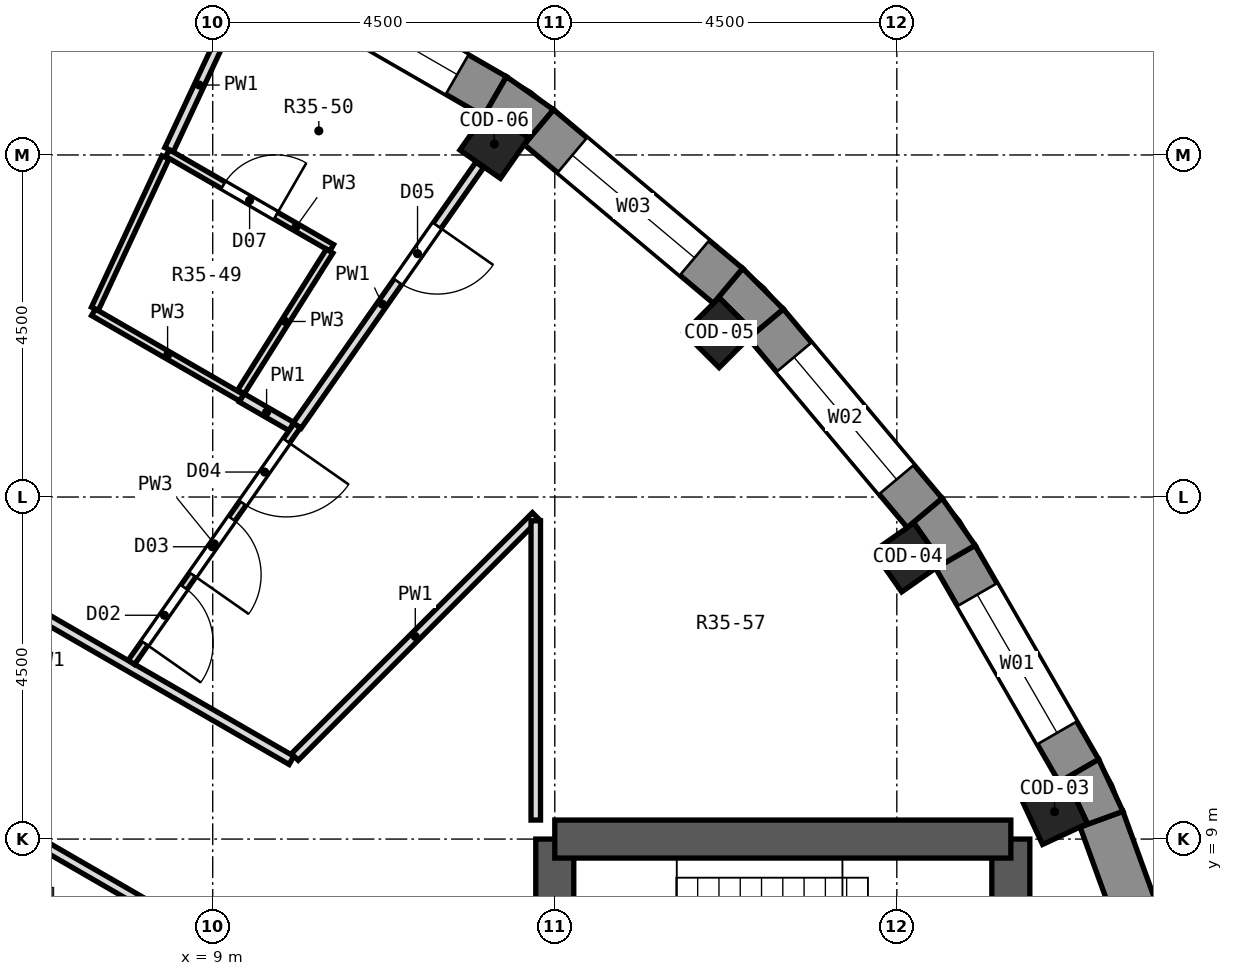
"""IFC4 building model, lengths in metres.
Left out: names, types, materials, properties, quantities, classifications, styles, units other than length and angle.
Written with IfcOpenShell. Run it as: python <this file> out.ifc"""

import sys

from ifc_helpers import new_model, si_unit, direction, frame, frame_2d, origin, origin_2d, place, context, subcontext, project, spatial, polyline, rectangle, outline, extrude, element, fill, save


model = new_model("IFC4")
c1 = context("Model", 3, precision=1e-05, world=origin(), true_north=direction((0.0, 1.0)))
c2 = subcontext(c1, "Body", "Model", "MODEL_VIEW")
j1 = project(units=[si_unit("LENGTHUNIT", "METRE"), si_unit("PLANEANGLEUNIT", "RADIAN")], contexts=[c1])
p1 = place(None, origin())
s1 = spatial("IfcSite", under=j1, at=p1, CompositionType="ELEMENT")
p2 = place(p1, origin())
s2 = spatial("IfcBuilding", under=s1, at=p2, CompositionType="ELEMENT")
p3 = place(p2, frame((0.0, 0.0, 249.5)))
s3 = spatial("IfcBuildingStorey", under=s2, at=p3, CompositionType="ELEMENT", Elevation=249.5)
for number, where, z_axis, x_axis in (
    (1, (20.075, 9.361, 0.0), (0.0, 0.0, 1.0), (0.906, 0.423, 0.0)),
    (2, (18.144, 12.705, 0.0), (0.0, 0.0, 1.0), (0.819, 0.574, 0.0)),
    (3, (15.662, 15.662, 0.0), (0.0, 0.0, 1.0), (0.707, 0.707, 0.0)),
    (4, (12.705, 18.144, 0.0), (0.0, 0.0, 1.0), (0.574, 0.819, 0.0)),
):
    element("IfcColumn", number, at=place(p3, frame(where, z_axis=z_axis, x_axis=x_axis)), inside=s3, PredefinedType="COLUMN", context=c2, shape_type="SweptSolid", body=[
        extrude(rectangle(XDim=0.65, YDim=0.65, at=origin_2d()), origin(), (0.0, 0.0, 1.0), 3.3),
    ])
p4 = place(p3, frame((13.5, -9.0, 0.0), z_axis=(0.0, 0.0, 1.0), x_axis=(0.0, 1.0, 0.0)))
e5 = element("IfcWall", 5, at=p4, inside=s3, PredefinedType="SHEAR", context=c2, shape_type="SweptSolid", body=[
    extrude(rectangle(XDim=18.0, YDim=0.5, at=frame_2d((9.0, 0.0))), origin(), (0.0, 0.0, 1.0), 3.3),
])
p5 = place(p4, frame((15.4, 0.0, 0.0)))
e6 = element("IfcOpeningElement", 6, at=p5, cuts=e5, PredefinedType="OPENING", context=c2, shape_type="SweptSolid", body=[
    extrude(rectangle(XDim=1.2, YDim=2.1, at=frame_2d((0.6, 1.05))), frame((0.0, 0.262, 0.0), z_axis=(0.0, -1.0, 0.0), x_axis=(1.0, 0.0, 0.0)), (0.0, 0.0, 1.0), 0.524),
])
p6 = place(p4, frame((1.4, 0.0, 0.0)))
e7 = element("IfcOpeningElement", 7, at=p6, cuts=e5, PredefinedType="OPENING", context=c2, shape_type="SweptSolid", body=[
    extrude(rectangle(XDim=1.2, YDim=2.1, at=frame_2d((0.6, 1.05))), frame((0.0, 0.262, 0.0), z_axis=(0.0, -1.0, 0.0), x_axis=(1.0, 0.0, 0.0)), (0.0, 0.0, 1.0), 0.524),
])
p7 = place(p4, frame((7.5, 0.0, 0.0)))
e8 = element("IfcOpeningElement", 8, at=p7, cuts=e5, PredefinedType="OPENING", context=c2, shape_type="SweptSolid", body=[
    extrude(rectangle(XDim=3.0, YDim=2.4, at=frame_2d((1.5, 1.2))), frame((0.0, 0.262, 0.0), z_axis=(0.0, -1.0, 0.0), x_axis=(1.0, 0.0, 0.0)), (0.0, 0.0, 1.0), 0.524),
])
p8 = place(p3, frame((19.5, -9.0, 0.0), z_axis=(0.0, 0.0, 1.0), x_axis=(0.0, 1.0, 0.0)))
e9 = element("IfcWall", 9, at=p8, inside=s3, PredefinedType="SHEAR", context=c2, shape_type="SweptSolid", body=[
    extrude(rectangle(XDim=18.0, YDim=0.5, at=frame_2d((9.0, 0.0))), origin(), (0.0, 0.0, 1.0), 3.3),
])
p9 = place(p8, frame((9.45, 0.0, 0.0)))
e10 = element("IfcOpeningElement", 10, at=p9, cuts=e9, PredefinedType="OPENING", context=c2, shape_type="SweptSolid", body=[
    extrude(rectangle(XDim=0.9, YDim=2.1, at=frame_2d((0.45, 1.05))), frame((0.0, 0.262, 0.0), z_axis=(0.0, -1.0, 0.0), x_axis=(1.0, 0.0, 0.0)), (0.0, 0.0, 1.0), 0.524),
])
p10 = place(p8, frame((7.65, 0.0, 0.0)))
e11 = element("IfcOpeningElement", 11, at=p10, cuts=e9, PredefinedType="OPENING", context=c2, shape_type="SweptSolid", body=[
    extrude(rectangle(XDim=0.9, YDim=2.1, at=frame_2d((0.45, 1.05))), frame((0.0, 0.262, 0.0), z_axis=(0.0, -1.0, 0.0), x_axis=(1.0, 0.0, 0.0)), (0.0, 0.0, 1.0), 0.524),
])
p11 = place(p3, frame((13.5, 9.0, 0.0), z_axis=(0.0, 0.0, 1.0), x_axis=(1.0, 0.0, 0.0)))
e12 = element("IfcWall", 12, at=p11, inside=s3, PredefinedType="SHEAR", context=c2, shape_type="SweptSolid", body=[
    extrude(rectangle(XDim=6.0, YDim=0.5, at=frame_2d((3.0, 0.0))), origin(), (0.0, 0.0, 1.0), 3.3),
])
p12 = place(p3, frame((21.805, 6.206, 0.0), z_axis=(0.0, 0.0, 1.0), x_axis=(-0.342056509473, 0.939679383794, 0.0)))
e13 = element("IfcWall", 13, at=p12, inside=s3, PredefinedType="SOLIDWALL", context=c2, shape_type="SweptSolid", body=[
    extrude(rectangle(XDim=3.252, YDim=0.6, at=frame_2d((1.626, 0.0))), origin(), (0.0, 0.0, 1.0), 2.9),
])
p13 = place(p3, frame((20.396, 9.898, 0.0), z_axis=(0.0, 0.0, 1.0), x_axis=(-0.500014901547, 0.866016800201, 0.0)))
e14 = element("IfcWall", 14, at=p13, inside=s3, PredefinedType="SOLIDWALL", context=c2, shape_type="SweptSolid", body=[
    extrude(rectangle(XDim=3.252, YDim=0.6, at=frame_2d((1.626, 0.0))), origin(), (0.0, 0.0, 1.0), 2.9),
])
p14 = place(p13, frame((0.576, 0.0, 0.9)))
e15 = element("IfcOpeningElement", 15, at=p14, cuts=e14, PredefinedType="OPENING", context=c2, shape_type="SweptSolid", body=[
    extrude(rectangle(XDim=2.1, YDim=1.8, at=frame_2d((1.05, 0.9))), frame((0.0, 0.312, 0.0), z_axis=(0.0, -1.0, 0.0), x_axis=(1.0, 0.0, 0.0)), (0.0, 0.0, 1.0), 0.624),
])
p15 = place(p3, frame((18.367, 13.29, 0.0), z_axis=(0.0, 0.0, 1.0), x_axis=(-0.64277291405, 0.766056773982, 0.0)))
e16 = element("IfcWall", 16, at=p15, inside=s3, PredefinedType="SOLIDWALL", context=c2, shape_type="SweptSolid", body=[
    extrude(rectangle(XDim=3.252, YDim=0.6, at=frame_2d((1.626, 0.0))), origin(), (0.0, 0.0, 1.0), 2.9),
])
p16 = place(p15, frame((0.576, 0.0, 0.9)))
e17 = element("IfcOpeningElement", 17, at=p16, cuts=e16, PredefinedType="OPENING", context=c2, shape_type="SweptSolid", body=[
    extrude(rectangle(XDim=2.1, YDim=1.8, at=frame_2d((1.05, 0.9))), frame((0.0, 0.312, 0.0), z_axis=(0.0, -1.0, 0.0), x_axis=(1.0, 0.0, 0.0)), (0.0, 0.0, 1.0), 0.624),
])
p17 = place(p3, frame((15.781, 16.277, 0.0), z_axis=(0.0, 0.0, 1.0), x_axis=(-0.766056773982, 0.64277291405, 0.0)))
e18 = element("IfcWall", 18, at=p17, inside=s3, PredefinedType="SOLIDWALL", context=c2, shape_type="SweptSolid", body=[
    extrude(rectangle(XDim=3.252, YDim=0.6, at=frame_2d((1.626, 0.0))), origin(), (0.0, 0.0, 1.0), 2.9),
])
p18 = place(p17, frame((0.576, 0.0, 0.9)))
e19 = element("IfcOpeningElement", 19, at=p18, cuts=e18, PredefinedType="OPENING", context=c2, shape_type="SweptSolid", body=[
    extrude(rectangle(XDim=2.1, YDim=1.8, at=frame_2d((1.05, 0.9))), frame((0.0, 0.312, 0.0), z_axis=(0.0, -1.0, 0.0), x_axis=(1.0, 0.0, 0.0)), (0.0, 0.0, 1.0), 0.624),
])
p19 = place(p3, frame((12.714, 18.77, 0.0), z_axis=(0.0, 0.0, 1.0), x_axis=(-0.866016800201, 0.500014901547, 0.0)))
e20 = element("IfcWall", 20, at=p19, inside=s3, PredefinedType="SOLIDWALL", context=c2, shape_type="SweptSolid", body=[
    extrude(rectangle(XDim=3.252, YDim=0.6, at=frame_2d((1.626, 0.0))), origin(), (0.0, 0.0, 1.0), 2.9),
])
p20 = place(p19, frame((0.576, 0.0, 0.9)))
e21 = element("IfcOpeningElement", 21, at=p20, cuts=e20, PredefinedType="OPENING", context=c2, shape_type="SweptSolid", body=[
    extrude(rectangle(XDim=2.1, YDim=1.8, at=frame_2d((1.05, 0.9))), frame((0.0, 0.312, 0.0), z_axis=(0.0, -1.0, 0.0), x_axis=(1.0, 0.0, 0.0)), (0.0, 0.0, 1.0), 0.624),
])
p21 = place(p3, origin())
e22 = element("IfcWall", 22, at=p21, inside=s3, PredefinedType="SOLIDWALL", context=c2, shape_type="SweptSolid", body=[
    extrude(outline(polyline([(20.975, 9.364), (20.656, 10.048), (20.136, 9.748), (20.232, 9.793), (20.507, 9.204), (20.411, 9.159), (20.975, 9.364)])), origin(), (0.0, 0.0, 1.0), 2.9),
])
p22 = place(p3, origin())
e23 = element("IfcWall", 23, at=p22, inside=s3, PredefinedType="SOLIDWALL", context=c2, shape_type="SweptSolid", body=[
    extrude(outline(polyline([(19.03, 12.864), (18.597, 13.482), (18.137, 13.097), (18.224, 13.157), (18.597, 12.625), (18.51, 12.564), (19.03, 12.864)])), origin(), (0.0, 0.0, 1.0), 2.9),
])
p23 = place(p3, origin())
e24 = element("IfcWall", 24, at=p23, inside=s3, PredefinedType="SOLIDWALL", context=c2, shape_type="SweptSolid", body=[
    extrude(outline(polyline([(15.973, 16.507), (15.588, 16.047), (15.662, 16.122), (16.122, 15.662), (16.047, 15.588), (16.507, 15.973), (15.973, 16.507)])), origin(), (0.0, 0.0, 1.0), 2.9),
])
p24 = place(p3, origin())
e25 = element("IfcWall", 25, at=p24, inside=s3, PredefinedType="SOLIDWALL", context=c2, shape_type="SweptSolid", body=[
    extrude(outline(polyline([(12.864, 19.03), (12.564, 18.51), (12.625, 18.597), (13.157, 18.224), (13.097, 18.137), (13.482, 18.597), (12.864, 19.03)])), origin(), (0.0, 0.0, 1.0), 2.9),
])
p25 = place(p3, frame((2.915, 11.146, 0.0), z_axis=(0.0, 0.0, 1.0), x_axis=(0.866022982797, -0.500004193249, 0.0)))
e26 = element("IfcWall", 26, at=p25, inside=s3, PredefinedType="PARTITIONING", context=c2, shape_type="SweptSolid", body=[
    extrude(rectangle(XDim=6.026, YDim=0.125, at=frame_2d((3.013, 0.0))), origin(), (0.0, 0.0, 1.0), 2.9),
])
p26 = place(p25, frame((2.498, 0.0, 0.0)))
e27 = element("IfcOpeningElement", 27, at=p26, cuts=e26, PredefinedType="OPENING", context=c2, shape_type="SweptSolid", body=[
    extrude(rectangle(XDim=1.0, YDim=2.1, at=frame_2d((0.5, 1.05))), frame((0.0, 0.074, 0.0), z_axis=(0.0, -1.0, 0.0), x_axis=(1.0, 0.0, 0.0)), (0.0, 0.0, 1.0), 0.149),
])
p27 = place(p3, frame((3.611, 13.747, 0.0), z_axis=(0.0, 0.0, 1.0), x_axis=(0.865964194244, -0.500106003051, 0.0)))
e28 = element("IfcWall", 28, at=p27, inside=s3, PredefinedType="PARTITIONING", context=c2, shape_type="SweptSolid", body=[
    extrude(rectangle(XDim=7.42, YDim=0.125, at=frame_2d((3.71, 0.0))), origin(), (0.0, 0.0, 1.0), 2.9),
])
p28 = place(p27, frame((2.007, 0.0, 0.0)))
e29 = element("IfcOpeningElement", 29, at=p28, cuts=e28, PredefinedType="OPENING", context=c2, shape_type="SweptSolid", body=[
    extrude(rectangle(XDim=1.0, YDim=2.1, at=frame_2d((0.5, 1.05))), frame((0.0, 0.074, 0.0), z_axis=(0.0, -1.0, 0.0), x_axis=(1.0, 0.0, 0.0)), (0.0, 0.0, 1.0), 0.149),
])
p29 = place(p3, frame((7.431, 15.931, 0.0), z_axis=(0.0, 0.0, 1.0), x_axis=(0.866046587367, -0.499963307164, 0.0)))
e30 = element("IfcWall", 30, at=p29, inside=s3, PredefinedType="PARTITIONING", context=c2, shape_type="SweptSolid", body=[
    extrude(rectangle(XDim=2.252, YDim=0.1, at=frame_2d((1.126, 0.0))), origin(), (0.0, 0.0, 1.0), 2.9),
])
p30 = place(p3, frame((9.381, 14.805, 0.0), z_axis=(0.0, 0.0, 1.0), x_axis=(0.866088799389, -0.499890179513, 0.0)))
e31 = element("IfcWall", 31, at=p30, inside=s3, PredefinedType="PARTITIONING", context=c2, shape_type="SweptSolid", body=[
    extrude(rectangle(XDim=0.756, YDim=0.125, at=frame_2d((0.378, 0.0))), origin(), (0.0, 0.0, 1.0), 2.9),
])
p31 = place(p3, frame((8.405, 18.025, 0.0), z_axis=(0.0, 0.0, 1.0), x_axis=(0.866060068719, -0.499939953764, 0.0)))
e32 = element("IfcWall", 32, at=p31, inside=s3, PredefinedType="PARTITIONING", context=c2, shape_type="SweptSolid", body=[
    extrude(rectangle(XDim=2.494, YDim=0.1, at=frame_2d((1.247, 0.0))), origin(), (0.0, 0.0, 1.0), 2.9),
])
p32 = place(p31, frame((0.847, 0.0, 0.0)))
e33 = element("IfcOpeningElement", 33, at=p32, cuts=e32, PredefinedType="OPENING", context=c2, shape_type="SweptSolid", body=[
    extrude(rectangle(XDim=0.8, YDim=2.1, at=frame_2d((0.4, 1.05))), frame((0.0, 0.062, 0.0), z_axis=(0.0, -1.0, 0.0), x_axis=(1.0, 0.0, 0.0)), (0.0, 0.0, 1.0), 0.124),
])
p33 = place(p3, frame((10.08, 10.08, 0.0), z_axis=(0.0, 0.0, 1.0), x_axis=(0.707106781187, 0.707106781187, 0.0)))
e34 = element("IfcWall", 34, at=p33, inside=s3, PredefinedType="PARTITIONING", context=c2, shape_type="SweptSolid", body=[
    extrude(rectangle(XDim=4.483, YDim=0.125, at=frame_2d((2.241, 0.0))), origin(), (0.0, 0.0, 1.0), 2.9),
])
p34 = place(p3, frame((7.93, 11.325, 0.0), z_axis=(0.0, 0.0, 1.0), x_axis=(0.57357434303, 0.819153510044, 0.0)))
e35 = element("IfcWall", 35, at=p34, inside=s3, PredefinedType="PARTITIONING", context=c2, shape_type="SweptSolid", body=[
    extrude(rectangle(XDim=3.803, YDim=0.1, at=frame_2d((1.902, 0.0))), origin(), (0.0, 0.0, 1.0), 2.9),
])
p35 = place(p34, frame((0.306, 0.0, 0.0)))
e36 = element("IfcOpeningElement", 36, at=p35, cuts=e35, PredefinedType="OPENING", context=c2, shape_type="SweptSolid", body=[
    extrude(rectangle(XDim=0.9, YDim=2.1, at=frame_2d((0.45, 1.05))), frame((0.0, 0.062, 0.0), z_axis=(0.0, -1.0, 0.0), x_axis=(1.0, 0.0, 0.0)), (0.0, 0.0, 1.0), 0.124),
])
p36 = place(p34, frame((1.406, 0.0, 0.0)))
e37 = element("IfcOpeningElement", 37, at=p36, cuts=e35, PredefinedType="OPENING", context=c2, shape_type="SweptSolid", body=[
    extrude(rectangle(XDim=0.9, YDim=2.1, at=frame_2d((0.45, 1.05))), frame((0.0, 0.062, 0.0), z_axis=(0.0, -1.0, 0.0), x_axis=(1.0, 0.0, 0.0)), (0.0, 0.0, 1.0), 0.124),
])
p37 = place(p34, frame((2.556, 0.0, 0.0)))
e38 = element("IfcOpeningElement", 38, at=p37, cuts=e35, PredefinedType="OPENING", context=c2, shape_type="SweptSolid", body=[
    extrude(rectangle(XDim=1.0, YDim=2.1, at=frame_2d((0.5, 1.05))), frame((0.0, 0.062, 0.0), z_axis=(0.0, -1.0, 0.0), x_axis=(1.0, 0.0, 0.0)), (0.0, 0.0, 1.0), 0.124),
])
p38 = place(p3, frame((10.112, 14.441, 0.0), z_axis=(0.0, 0.0, 1.0), x_axis=(0.57362673896, 0.819116819721, 0.0)))
e39 = element("IfcWall", 39, at=p38, inside=s3, PredefinedType="PARTITIONING", context=c2, shape_type="SweptSolid", body=[
    extrude(rectangle(XDim=4.186, YDim=0.125, at=frame_2d((2.093, 0.0))), origin(), (0.0, 0.0, 1.0), 2.9),
])
p39 = place(p38, frame((2.309, 0.0, 0.0)))
e40 = element("IfcOpeningElement", 40, at=p39, cuts=e39, PredefinedType="OPENING", context=c2, shape_type="SweptSolid", body=[
    extrude(rectangle(XDim=0.9, YDim=2.1, at=frame_2d((0.45, 1.05))), frame((0.0, 0.074, 0.0), z_axis=(0.0, -1.0, 0.0), x_axis=(1.0, 0.0, 0.0)), (0.0, 0.0, 1.0), 0.149),
])
p40 = place(p3, frame((9.371, 14.883, 0.0), z_axis=(0.0, 0.0, 1.0), x_axis=(0.532952249521, 0.846145318329, 0.0)))
e41 = element("IfcWall", 41, at=p40, inside=s3, PredefinedType="PARTITIONING", context=c2, shape_type="SweptSolid", body=[
    extrude(rectangle(XDim=2.19, YDim=0.1, at=frame_2d((1.095, 0.0))), origin(), (0.0, 0.0, 1.0), 2.9),
])
p41 = place(p3, frame((8.426, 18.07, 0.0), z_axis=(0.0, 0.0, 1.0), x_axis=(0.423433748068, 0.905927072671, 0.0)))
e42 = element("IfcWall", 42, at=p41, inside=s3, PredefinedType="PARTITIONING", context=c2, shape_type="SweptSolid", body=[
    extrude(rectangle(XDim=1.877, YDim=0.125, at=frame_2d((0.938, 0.0))), origin(), (0.0, 0.0, 1.0), 2.9),
])
p42 = place(p3, frame((7.45, 15.977, 0.0), z_axis=(0.0, 0.0, 1.0), x_axis=(0.422642091252, 0.906296674772, 0.0)))
e43 = element("IfcWall", 43, at=p42, inside=s3, PredefinedType="PARTITIONING", context=c2, shape_type="SweptSolid", body=[
    extrude(rectangle(XDim=2.197, YDim=0.1, at=frame_2d((1.098, 0.0))), origin(), (0.0, 0.0, 1.0), 2.9),
])
p43 = place(p3, frame((13.25, 9.25, 0.0), z_axis=(0.0, 0.0, 1.0), x_axis=(0.0, 1.0, 0.0)))
e44 = element("IfcWall", 44, at=p43, inside=s3, PredefinedType="PARTITIONING", context=c2, shape_type="SweptSolid", body=[
    extrude(rectangle(XDim=3.938, YDim=0.125, at=frame_2d((1.969, 0.0))), origin(), (0.0, 0.0, 1.0), 2.9),
])
p44 = place(p14, origin())
e45 = element("IfcWindow", 45, at=p44, inside=s3, PartitioningType="SINGLE_PANEL", PredefinedType="WINDOW", context=c2, shape_type="SweptSolid", body=[
    extrude(rectangle(XDim=2.1, YDim=1.8, at=frame_2d((1.05, 0.9))), frame((0.0, 0.18, 0.0), z_axis=(0.0, -1.0, 0.0), x_axis=(1.0, 0.0, 0.0)), (0.0, 0.0, 1.0), 0.06),
])
fill(e15, e45)
p45 = place(p16, origin())
e46 = element("IfcWindow", 46, at=p45, inside=s3, PartitioningType="SINGLE_PANEL", PredefinedType="WINDOW", context=c2, shape_type="SweptSolid", body=[
    extrude(rectangle(XDim=2.1, YDim=1.8, at=frame_2d((1.05, 0.9))), frame((0.0, 0.18, 0.0), z_axis=(0.0, -1.0, 0.0), x_axis=(1.0, 0.0, 0.0)), (0.0, 0.0, 1.0), 0.06),
])
fill(e17, e46)
p46 = place(p18, origin())
e47 = element("IfcWindow", 47, at=p46, inside=s3, PartitioningType="SINGLE_PANEL", PredefinedType="WINDOW", context=c2, shape_type="SweptSolid", body=[
    extrude(rectangle(XDim=2.1, YDim=1.8, at=frame_2d((1.05, 0.9))), frame((0.0, 0.18, 0.0), z_axis=(0.0, -1.0, 0.0), x_axis=(1.0, 0.0, 0.0)), (0.0, 0.0, 1.0), 0.06),
])
fill(e19, e47)
p47 = place(p20, origin())
e48 = element("IfcWindow", 48, at=p47, inside=s3, PartitioningType="SINGLE_PANEL", PredefinedType="WINDOW", context=c2, shape_type="SweptSolid", body=[
    extrude(rectangle(XDim=2.1, YDim=1.8, at=frame_2d((1.05, 0.9))), frame((0.0, 0.18, 0.0), z_axis=(0.0, -1.0, 0.0), x_axis=(1.0, 0.0, 0.0)), (0.0, 0.0, 1.0), 0.06),
])
fill(e21, e48)
p48 = place(p35, frame((0.9, 0.0, 0.0), z_axis=(0.0, 0.0, 1.0), x_axis=(-1.0, 0.0, 0.0)))
e49 = element("IfcDoor", 49, at=p48, inside=s3, OperationType="SINGLE_SWING_RIGHT", PredefinedType="DOOR", context=c2, shape_type="SweptSolid", body=[
    extrude(rectangle(XDim=0.9, YDim=2.1, at=frame_2d((0.45, 1.05))), frame((0.0, 0.025, 0.0), z_axis=(0.0, -1.0, 0.0), x_axis=(1.0, 0.0, 0.0)), (0.0, 0.0, 1.0), 0.05),
])
fill(e36, e49)
p49 = place(p36, frame((0.9, 0.0, 0.0), z_axis=(0.0, 0.0, 1.0), x_axis=(-1.0, 0.0, 0.0)))
e50 = element("IfcDoor", 50, at=p49, inside=s3, OperationType="SINGLE_SWING_RIGHT", PredefinedType="DOOR", context=c2, shape_type="SweptSolid", body=[
    extrude(rectangle(XDim=0.9, YDim=2.1, at=frame_2d((0.45, 1.05))), frame((0.0, 0.025, 0.0), z_axis=(0.0, -1.0, 0.0), x_axis=(1.0, 0.0, 0.0)), (0.0, 0.0, 1.0), 0.05),
])
fill(e37, e50)
p50 = place(p37, frame((1.0, 0.0, 0.0), z_axis=(0.0, 0.0, 1.0), x_axis=(-1.0, 0.0, 0.0)))
e51 = element("IfcDoor", 51, at=p50, inside=s3, OperationType="SINGLE_SWING_LEFT", PredefinedType="DOOR", context=c2, shape_type="SweptSolid", body=[
    extrude(rectangle(XDim=1.0, YDim=2.1, at=frame_2d((0.5, 1.05))), frame((0.0, 0.025, 0.0), z_axis=(0.0, -1.0, 0.0), x_axis=(1.0, 0.0, 0.0)), (0.0, 0.0, 1.0), 0.05),
])
fill(e38, e51)
p51 = place(p39, frame((0.9, 0.0, 0.0), z_axis=(0.0, 0.0, 1.0), x_axis=(-1.0, 0.0, 0.0)))
e52 = element("IfcDoor", 52, at=p51, inside=s3, OperationType="SINGLE_SWING_LEFT", PredefinedType="DOOR", context=c2, shape_type="SweptSolid", body=[
    extrude(rectangle(XDim=0.9, YDim=2.1, at=frame_2d((0.45, 1.05))), frame((0.0, 0.025, 0.0), z_axis=(0.0, -1.0, 0.0), x_axis=(1.0, 0.0, 0.0)), (0.0, 0.0, 1.0), 0.05),
])
fill(e40, e52)
p52 = place(p32, origin())
e53 = element("IfcDoor", 53, at=p52, inside=s3, OperationType="SINGLE_SWING_RIGHT", PredefinedType="DOOR", context=c2, shape_type="SweptSolid", body=[
    extrude(rectangle(XDim=0.8, YDim=2.1, at=frame_2d((0.4, 1.05))), frame((0.0, 0.025, 0.0), z_axis=(0.0, -1.0, 0.0), x_axis=(1.0, 0.0, 0.0)), (0.0, 0.0, 1.0), 0.05),
])
fill(e33, e53)
save(model, sys.argv[1])
